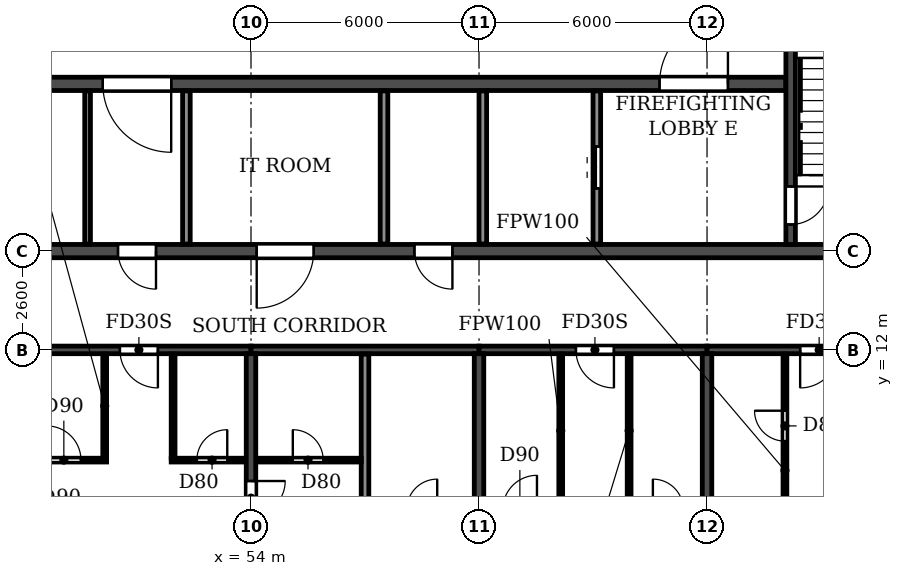
"""IFC4 building model, lengths in metres.
Left out: names, types, materials, properties, quantities, classifications, styles, units other than length and angle.
Written with IfcOpenShell. Run it as: python <this file> out.ifc"""

import sys

from ifc_helpers import new_model, si_unit, direction, frame, frame_2d, origin, place, context, subcontext, project, spatial, rectangle, extrude, element, fill, save


model = new_model("IFC4")
c1 = context("Model", 3, precision=1e-05, world=origin(), true_north=direction((0.0, 1.0)))
c2 = subcontext(c1, "Body", "Model", "MODEL_VIEW")
j1 = project(units=[si_unit("LENGTHUNIT", "METRE"), si_unit("PLANEANGLEUNIT", "RADIAN")], contexts=[c1])
p1 = place(None, origin())
s1 = spatial("IfcSite", under=j1, at=p1, CompositionType="ELEMENT")
p2 = place(p1, origin())
s2 = spatial("IfcBuilding", under=s1, at=p2, CompositionType="ELEMENT")
p3 = place(p2, frame((0.0, 0.0, 221.4)))
s3 = spatial("IfcBuildingStorey", under=s2, at=p3, CompositionType="ELEMENT", Elevation=221.4)
p4 = place(p3, frame((54.0, 0.2, 0.0), z_axis=(0.0, 0.0, 1.0), x_axis=(0.0, 1.0, 0.0)))
e1 = element("IfcWall", 1, at=p4, inside=s3, PredefinedType="SHEAR", context=c2, shape_type="SweptSolid", body=[
    extrude(rectangle(XDim=11.7, YDim=0.25, at=frame_2d((5.85, 0.0))), origin(), (0.0, 0.0, 1.0), 3.08),
])
p5 = place(p4, frame((7.45, 0.0, 0.0)))
e2 = element("IfcOpeningElement", 2, at=p5, cuts=e1, PredefinedType="OPENING", context=c2, shape_type="SweptSolid", body=[
    extrude(rectangle(XDim=0.9, YDim=2.1, at=frame_2d((0.45, 1.05))), frame((0.0, 0.135, 0.0), z_axis=(0.0, -1.0, 0.0), x_axis=(1.0, 0.0, 0.0)), (0.0, 0.0, 1.0), 0.27),
])
p6 = place(p3, frame((60.0, 0.2, 0.0), z_axis=(0.0, 0.0, 1.0), x_axis=(0.0, 1.0, 0.0)))
e3 = element("IfcWall", 3, at=p6, inside=s3, PredefinedType="SHEAR", context=c2, shape_type="SweptSolid", body=[
    extrude(rectangle(XDim=11.7, YDim=0.25, at=frame_2d((5.85, 0.0))), origin(), (0.0, 0.0, 1.0), 3.08),
])
p7 = place(p6, frame((6.15, 0.0, 0.0)))
e4 = element("IfcOpeningElement", 4, at=p7, cuts=e3, PredefinedType="OPENING", context=c2, shape_type="SweptSolid", body=[
    extrude(rectangle(XDim=0.9, YDim=2.1, at=frame_2d((0.45, 1.05))), frame((0.0, 0.135, 0.0), z_axis=(0.0, -1.0, 0.0), x_axis=(1.0, 0.0, 0.0)), (0.0, 0.0, 1.0), 0.27),
])
p8 = place(p3, frame((66.0, 0.2, 0.0), z_axis=(0.0, 0.0, 1.0), x_axis=(0.0, 1.0, 0.0)))
e5 = element("IfcWall", 5, at=p8, inside=s3, PredefinedType="SHEAR", context=c2, shape_type="SweptSolid", body=[
    extrude(rectangle(XDim=11.7, YDim=0.25, at=frame_2d((5.85, 0.0))), origin(), (0.0, 0.0, 1.0), 3.08),
])
p9 = place(p3, frame((48.0, 12.0, 0.0), z_axis=(0.0, 0.0, 1.0), x_axis=(1.0, 0.0, 0.0)))
e6 = element("IfcWall", 6, at=p9, inside=s3, PredefinedType="SHEAR", context=c2, shape_type="SweptSolid", body=[
    extrude(rectangle(XDim=6.0, YDim=0.2, at=frame_2d((3.0, 0.0))), origin(), (0.0, 0.0, 1.0), 2.48),
])
p10 = place(p9, frame((2.55, 0.0, 0.0)))
e7 = element("IfcOpeningElement", 7, at=p10, cuts=e6, PredefinedType="OPENING", context=c2, shape_type="SweptSolid", body=[
    extrude(rectangle(XDim=1.0, YDim=2.1, at=frame_2d((0.5, 1.05))), frame((0.0, 0.11, 0.0), z_axis=(0.0, -1.0, 0.0), x_axis=(1.0, 0.0, 0.0)), (0.0, 0.0, 1.0), 0.22),
])
p11 = place(p3, frame((54.0, 12.0, 0.0), z_axis=(0.0, 0.0, 1.0), x_axis=(1.0, 0.0, 0.0)))
e8 = element("IfcWall", 8, at=p11, inside=s3, PredefinedType="SHEAR", context=c2, shape_type="SweptSolid", body=[
    extrude(rectangle(XDim=6.0, YDim=0.2, at=frame_2d((3.0, 0.0))), origin(), (0.0, 0.0, 1.0), 2.48),
])
p12 = place(p3, frame((60.0, 12.0, 0.0), z_axis=(0.0, 0.0, 1.0), x_axis=(1.0, 0.0, 0.0)))
e9 = element("IfcWall", 9, at=p12, inside=s3, PredefinedType="SHEAR", context=c2, shape_type="SweptSolid", body=[
    extrude(rectangle(XDim=6.0, YDim=0.2, at=frame_2d((3.0, 0.0))), origin(), (0.0, 0.0, 1.0), 2.48),
])
p13 = place(p12, frame((2.55, 0.0, 0.0)))
e10 = element("IfcOpeningElement", 10, at=p13, cuts=e9, PredefinedType="OPENING", context=c2, shape_type="SweptSolid", body=[
    extrude(rectangle(XDim=1.0, YDim=2.1, at=frame_2d((0.5, 1.05))), frame((0.0, 0.11, 0.0), z_axis=(0.0, -1.0, 0.0), x_axis=(1.0, 0.0, 0.0)), (0.0, 0.0, 1.0), 0.22),
])
p14 = place(p3, frame((66.0, 12.0, 0.0), z_axis=(0.0, 0.0, 1.0), x_axis=(1.0, 0.0, 0.0)))
e11 = element("IfcWall", 11, at=p14, inside=s3, PredefinedType="SHEAR", context=c2, shape_type="SweptSolid", body=[
    extrude(rectangle(XDim=6.0, YDim=0.2, at=frame_2d((3.0, 0.0))), origin(), (0.0, 0.0, 1.0), 2.48),
])
p15 = place(p14, frame((2.45, 0.0, 0.0)))
e12 = element("IfcOpeningElement", 12, at=p15, cuts=e11, PredefinedType="OPENING", context=c2, shape_type="SweptSolid", body=[
    extrude(rectangle(XDim=1.0, YDim=2.1, at=frame_2d((0.5, 1.05))), frame((0.0, 0.11, 0.0), z_axis=(0.0, -1.0, 0.0), x_axis=(1.0, 0.0, 0.0)), (0.0, 0.0, 1.0), 0.22),
])
p16 = place(p3, frame((18.2, 14.6, 0.0), z_axis=(0.0, 0.0, 1.0), x_axis=(1.0, 0.0, 0.0)))
e13 = element("IfcWall", 13, at=p16, inside=s3, PredefinedType="SOLIDWALL", context=c2, shape_type="SweptSolid", body=[
    extrude(rectangle(XDim=65.6, YDim=0.35, at=frame_2d((32.8, 0.0))), origin(), (0.0, 0.0, 1.0), 3.08),
])
p17 = place(p16, frame((0.7, 0.0, 0.0)))
e14 = element("IfcOpeningElement", 14, at=p17, cuts=e13, PredefinedType="OPENING", context=c2, shape_type="SweptSolid", body=[
    extrude(rectangle(XDim=1.0, YDim=2.1, at=frame_2d((0.5, 1.05))), frame((0.0, 0.185, 0.0), z_axis=(0.0, -1.0, 0.0), x_axis=(1.0, 0.0, 0.0)), (0.0, 0.0, 1.0), 0.37),
])
p18 = place(p16, frame((8.6, 0.0, 0.0)))
e15 = element("IfcOpeningElement", 15, at=p18, cuts=e13, PredefinedType="OPENING", context=c2, shape_type="SweptSolid", body=[
    extrude(rectangle(XDim=1.0, YDim=2.1, at=frame_2d((0.5, 1.05))), frame((0.0, 0.185, 0.0), z_axis=(0.0, -1.0, 0.0), x_axis=(1.0, 0.0, 0.0)), (0.0, 0.0, 1.0), 0.37),
])
p19 = place(p16, frame((13.2, 0.0, 0.0)))
e16 = element("IfcOpeningElement", 16, at=p19, cuts=e13, PredefinedType="OPENING", context=c2, shape_type="SweptSolid", body=[
    extrude(rectangle(XDim=1.0, YDim=2.1, at=frame_2d((0.5, 1.05))), frame((0.0, 0.185, 0.0), z_axis=(0.0, -1.0, 0.0), x_axis=(1.0, 0.0, 0.0)), (0.0, 0.0, 1.0), 0.37),
])
p20 = place(p16, frame((27.1, 0.0, 0.0)))
e17 = element("IfcOpeningElement", 17, at=p20, cuts=e13, PredefinedType="OPENING", context=c2, shape_type="SweptSolid", body=[
    extrude(rectangle(XDim=1.0, YDim=2.1, at=frame_2d((0.5, 1.05))), frame((0.0, 0.185, 0.0), z_axis=(0.0, -1.0, 0.0), x_axis=(1.0, 0.0, 0.0)), (0.0, 0.0, 1.0), 0.37),
])
p21 = place(p16, frame((32.3, 0.0, 0.0)))
e18 = element("IfcOpeningElement", 18, at=p21, cuts=e13, PredefinedType="OPENING", context=c2, shape_type="SweptSolid", body=[
    extrude(rectangle(XDim=1.0, YDim=2.1, at=frame_2d((0.5, 1.05))), frame((0.0, 0.185, 0.0), z_axis=(0.0, -1.0, 0.0), x_axis=(1.0, 0.0, 0.0)), (0.0, 0.0, 1.0), 0.37),
])
p22 = place(p16, frame((35.95, 0.0, 0.0)))
e19 = element("IfcOpeningElement", 19, at=p22, cuts=e13, PredefinedType="OPENING", context=c2, shape_type="SweptSolid", body=[
    extrude(rectangle(XDim=1.5, YDim=2.1, at=frame_2d((0.75, 1.05))), frame((0.0, 0.185, 0.0), z_axis=(0.0, -1.0, 0.0), x_axis=(1.0, 0.0, 0.0)), (0.0, 0.0, 1.0), 0.37),
])
p23 = place(p16, frame((40.1, 0.0, 0.0)))
e20 = element("IfcOpeningElement", 20, at=p23, cuts=e13, PredefinedType="OPENING", context=c2, shape_type="SweptSolid", body=[
    extrude(rectangle(XDim=1.0, YDim=2.1, at=frame_2d((0.5, 1.05))), frame((0.0, 0.185, 0.0), z_axis=(0.0, -1.0, 0.0), x_axis=(1.0, 0.0, 0.0)), (0.0, 0.0, 1.0), 0.37),
])
p24 = place(p16, frame((51.4, 0.0, 0.0)))
e21 = element("IfcOpeningElement", 21, at=p24, cuts=e13, PredefinedType="OPENING", context=c2, shape_type="SweptSolid", body=[
    extrude(rectangle(XDim=1.0, YDim=2.1, at=frame_2d((0.5, 1.05))), frame((0.0, 0.185, 0.0), z_axis=(0.0, -1.0, 0.0), x_axis=(1.0, 0.0, 0.0)), (0.0, 0.0, 1.0), 0.37),
])
p25 = place(p16, frame((56.0, 0.0, 0.0)))
e22 = element("IfcOpeningElement", 22, at=p25, cuts=e13, PredefinedType="OPENING", context=c2, shape_type="SweptSolid", body=[
    extrude(rectangle(XDim=1.0, YDim=2.1, at=frame_2d((0.5, 1.05))), frame((0.0, 0.185, 0.0), z_axis=(0.0, -1.0, 0.0), x_axis=(1.0, 0.0, 0.0)), (0.0, 0.0, 1.0), 0.37),
])
p26 = place(p16, frame((63.9, 0.0, 0.0)))
e23 = element("IfcOpeningElement", 23, at=p26, cuts=e13, PredefinedType="OPENING", context=c2, shape_type="SweptSolid", body=[
    extrude(rectangle(XDim=1.0, YDim=2.1, at=frame_2d((0.5, 1.05))), frame((0.0, 0.185, 0.0), z_axis=(0.0, -1.0, 0.0), x_axis=(1.0, 0.0, 0.0)), (0.0, 0.0, 1.0), 0.37),
])
p27 = place(p3, frame((33.925, 19.0, 0.0), z_axis=(0.0, 0.0, 1.0), x_axis=(1.0, 0.0, 0.0)))
e24 = element("IfcWall", 24, at=p27, inside=s3, PredefinedType="SOLIDWALL", context=c2, shape_type="SweptSolid", body=[
    extrude(rectangle(XDim=34.15, YDim=0.35, at=frame_2d((17.075, 0.0))), origin(), (0.0, 0.0, 1.0), 3.08),
])
p28 = place(p27, frame((16.175, 0.0, 0.0)))
e25 = element("IfcOpeningElement", 25, at=p28, cuts=e24, PredefinedType="OPENING", context=c2, shape_type="SweptSolid", body=[
    extrude(rectangle(XDim=1.8, YDim=2.1, at=frame_2d((0.9, 1.05))), frame((0.0, 0.185, 0.0), z_axis=(0.0, -1.0, 0.0), x_axis=(1.0, 0.0, 0.0)), (0.0, 0.0, 1.0), 0.37),
])
p29 = place(p27, frame((1.525, 0.0, 0.0)))
e26 = element("IfcOpeningElement", 26, at=p29, cuts=e24, PredefinedType="OPENING", context=c2, shape_type="SweptSolid", body=[
    extrude(rectangle(XDim=1.8, YDim=2.1, at=frame_2d((0.9, 1.05))), frame((0.0, 0.185, 0.0), z_axis=(0.0, -1.0, 0.0), x_axis=(1.0, 0.0, 0.0)), (0.0, 0.0, 1.0), 0.37),
])
p30 = place(p27, frame((30.825, 0.0, 0.0)))
e27 = element("IfcOpeningElement", 27, at=p30, cuts=e24, PredefinedType="OPENING", context=c2, shape_type="SweptSolid", body=[
    extrude(rectangle(XDim=1.8, YDim=2.1, at=frame_2d((0.9, 1.05))), frame((0.0, 0.185, 0.0), z_axis=(0.0, -1.0, 0.0), x_axis=(1.0, 0.0, 0.0)), (0.0, 0.0, 1.0), 0.37),
])
p31 = place(p3, frame((68.2, 14.775, 0.0), z_axis=(0.0, 0.0, 1.0), x_axis=(0.0, 1.0, 0.0)))
e28 = element("IfcWall", 28, at=p31, inside=s3, PredefinedType="SOLIDWALL", context=c2, shape_type="SweptSolid", body=[
    extrude(rectangle(XDim=7.7, YDim=0.25, at=frame_2d((3.85, 0.0))), origin(), (0.0, 0.0, 1.0), 3.08),
])
p32 = place(p31, frame((0.525, 0.0, 0.0)))
e29 = element("IfcOpeningElement", 29, at=p32, cuts=e28, PredefinedType="OPENING", context=c2, shape_type="SweptSolid", body=[
    extrude(rectangle(XDim=1.0, YDim=2.1, at=frame_2d((0.5, 1.05))), frame((0.0, 0.135, 0.0), z_axis=(0.0, -1.0, 0.0), x_axis=(1.0, 0.0, 0.0)), (0.0, 0.0, 1.0), 0.27),
])
p33 = place(p3, frame((49.7, 14.785, 0.0), z_axis=(0.0, 0.0, 1.0), x_axis=(0.0, 1.0, 0.0)))
e30 = element("IfcWall", 30, at=p33, inside=s3, PredefinedType="PARTITIONING", context=c2, shape_type="SweptSolid", body=[
    extrude(rectangle(XDim=4.03, YDim=0.15, at=frame_2d((2.015, 0.0))), origin(), (0.0, 0.0, 1.0), 3.08),
])
p34 = place(p3, frame((57.0, 0.06, 0.0), z_axis=(0.0, 0.0, 1.0), x_axis=(0.0, 1.0, 0.0)))
e31 = element("IfcWall", 31, at=p34, inside=s3, PredefinedType="PARTITIONING", context=c2, shape_type="SweptSolid", body=[
    extrude(rectangle(XDim=11.83, YDim=0.2, at=frame_2d((5.915, 0.0))), origin(), (0.0, 0.0, 1.0), 3.08),
])
p35 = place(p3, frame((48.135, 9.1, 0.0), z_axis=(0.0, 0.0, 1.0), x_axis=(1.0, 0.0, 0.0)))
e32 = element("IfcWall", 32, at=p35, inside=s3, PredefinedType="PARTITIONING", context=c2, shape_type="SweptSolid", body=[
    extrude(rectangle(XDim=2.065, YDim=0.1, at=frame_2d((1.032, 0.0))), origin(), (0.0, 0.0, 1.0), 3.08),
])
p36 = place(p35, frame((0.49, 0.0, 0.0)))
e33 = element("IfcOpeningElement", 33, at=p36, cuts=e32, PredefinedType="OPENING", context=c2, shape_type="SweptSolid", body=[
    extrude(rectangle(XDim=0.9, YDim=2.1, at=frame_2d((0.45, 1.05))), frame((0.0, 0.06, 0.0), z_axis=(0.0, -1.0, 0.0), x_axis=(1.0, 0.0, 0.0)), (0.0, 0.0, 1.0), 0.12),
])
p37 = place(p3, frame((51.9, 9.1, 0.0), z_axis=(0.0, 0.0, 1.0), x_axis=(1.0, 0.0, 0.0)))
e34 = element("IfcWall", 34, at=p37, inside=s3, PredefinedType="PARTITIONING", context=c2, shape_type="SweptSolid", body=[
    extrude(rectangle(XDim=1.965, YDim=0.1, at=frame_2d((0.982, 0.0))), origin(), (0.0, 0.0, 1.0), 3.08),
])
p38 = place(p37, frame((0.675, 0.0, 0.0)))
e35 = element("IfcOpeningElement", 35, at=p38, cuts=e34, PredefinedType="OPENING", context=c2, shape_type="SweptSolid", body=[
    extrude(rectangle(XDim=0.8, YDim=2.1, at=frame_2d((0.4, 1.05))), frame((0.0, 0.06, 0.0), z_axis=(0.0, -1.0, 0.0), x_axis=(1.0, 0.0, 0.0)), (0.0, 0.0, 1.0), 0.12),
])
p39 = place(p3, frame((54.135, 9.1, 0.0), z_axis=(0.0, 0.0, 1.0), x_axis=(1.0, 0.0, 0.0)))
e36 = element("IfcWall", 36, at=p39, inside=s3, PredefinedType="PARTITIONING", context=c2, shape_type="SweptSolid", body=[
    extrude(rectangle(XDim=2.765, YDim=0.1, at=frame_2d((1.382, 0.0))), origin(), (0.0, 0.0, 1.0), 3.08),
])
p40 = place(p39, frame((0.965, 0.0, 0.0)))
e37 = element("IfcOpeningElement", 37, at=p40, cuts=e36, PredefinedType="OPENING", context=c2, shape_type="SweptSolid", body=[
    extrude(rectangle(XDim=0.8, YDim=2.1, at=frame_2d((0.4, 1.05))), frame((0.0, 0.06, 0.0), z_axis=(0.0, -1.0, 0.0), x_axis=(1.0, 0.0, 0.0)), (0.0, 0.0, 1.0), 0.12),
])
for number, where, z_axis, x_axis in (
    (38, (50.15, 9.15, 0.0), (0.0, 0.0, 1.0), (0.0, 1.0, 0.0)),
    (39, (51.95, 9.15, 0.0), (0.0, 0.0, 1.0), (0.0, 1.0, 0.0)),
):
    element("IfcWall", number, at=place(p3, frame(where, z_axis=z_axis, x_axis=x_axis)), inside=s3, PredefinedType="PARTITIONING", context=c2, shape_type="SweptSolid", body=[
        extrude(rectangle(XDim=2.74, YDim=0.1, at=frame_2d((1.37, 0.0))), origin(), (0.0, 0.0, 1.0), 3.08),
    ])
for number, where, z_axis, x_axis in (
    (40, (62.15, 7.85, 0.0), (0.0, 0.0, 1.0), (0.0, 1.0, 0.0)),
    (41, (63.95, 7.85, 0.0), (0.0, 0.0, 1.0), (0.0, 1.0, 0.0)),
):
    element("IfcWall", number, at=place(p3, frame(where, z_axis=z_axis, x_axis=x_axis)), inside=s3, PredefinedType="PARTITIONING", context=c2, shape_type="SweptSolid", body=[
        extrude(rectangle(XDim=4.04, YDim=0.1, at=frame_2d((2.02, 0.0))), origin(), (0.0, 0.0, 1.0), 3.08),
    ])
p41 = place(p3, frame((68.05, 8.05, 0.0), z_axis=(0.0, 0.0, 1.0), x_axis=(0.0, 1.0, 0.0)))
e42 = element("IfcWall", 42, at=p41, inside=s3, PredefinedType="PARTITIONING", context=c2, shape_type="SweptSolid", body=[
    extrude(rectangle(XDim=3.84, YDim=0.1, at=frame_2d((1.92, 0.0))), origin(), (0.0, 0.0, 1.0), 3.08),
])
p42 = place(p41, frame((1.55, 0.0, 0.0)))
e43 = element("IfcOpeningElement", 43, at=p42, cuts=e42, PredefinedType="OPENING", context=c2, shape_type="SweptSolid", body=[
    extrude(rectangle(XDim=0.8, YDim=2.1, at=frame_2d((0.4, 1.05))), frame((0.0, 0.06, 0.0), z_axis=(0.0, -1.0, 0.0), x_axis=(1.0, 0.0, 0.0)), (0.0, 0.0, 1.0), 0.12),
])
for number, where, z_axis, x_axis in (
    (44, (52.3, 14.785, 0.0), (0.0, 0.0, 1.0), (0.0, 1.0, 0.0)),
    (45, (57.5, 14.785, 0.0), (0.0, 0.0, 1.0), (0.0, 1.0, 0.0)),
    (46, (60.1, 14.785, 0.0), (0.0, 0.0, 1.0), (0.0, 1.0, 0.0)),
):
    element("IfcWall", number, at=place(p3, frame(where, z_axis=z_axis, x_axis=x_axis)), inside=s3, PredefinedType="PARTITIONING", context=c2, shape_type="SweptSolid", body=[
        extrude(rectangle(XDim=4.03, YDim=0.2, at=frame_2d((2.015, 0.0))), origin(), (0.0, 0.0, 1.0), 3.08),
    ])
p43 = place(p3, frame((63.1, 14.785, 0.0), z_axis=(0.0, 0.0, 1.0), x_axis=(0.0, 1.0, 0.0)))
e47 = element("IfcWall", 47, at=p43, inside=s3, PredefinedType="PARTITIONING", context=c2, shape_type="SweptSolid", body=[
    extrude(rectangle(XDim=4.03, YDim=0.2, at=frame_2d((2.015, 0.0))), origin(), (0.0, 0.0, 1.0), 3.08),
])
p44 = place(p43, frame((1.465, 0.0, 0.0)))
e48 = element("IfcOpeningElement", 48, at=p44, cuts=e47, PredefinedType="OPENING", context=c2, shape_type="SweptSolid", body=[
    extrude(rectangle(XDim=1.1, YDim=2.1, at=frame_2d((0.55, 1.05))), frame((0.0, 0.11, 0.0), z_axis=(0.0, -1.0, 0.0), x_axis=(1.0, 0.0, 0.0)), (0.0, 0.0, 1.0), 0.22),
])
p45 = place(p21, frame((1.0, 0.0, 0.0), z_axis=(0.0, 0.0, 1.0), x_axis=(-1.0, 0.0, 0.0)))
e49 = element("IfcDoor", 49, at=p45, inside=s3, OperationType="SINGLE_SWING_LEFT", PredefinedType="DOOR", context=c2, shape_type="SweptSolid", body=[
    extrude(rectangle(XDim=1.0, YDim=2.1, at=frame_2d((0.5, 1.05))), frame((0.0, 0.025, 0.0), z_axis=(0.0, -1.0, 0.0), x_axis=(1.0, 0.0, 0.0)), (0.0, 0.0, 1.0), 0.05),
])
fill(e18, e49)
p46 = place(p22, frame((1.5, 0.0, 0.0), z_axis=(0.0, 0.0, 1.0), x_axis=(-1.0, 0.0, 0.0)))
e50 = element("IfcDoor", 50, at=p46, inside=s3, OperationType="DOUBLE_DOOR_SINGLE_SWING", PredefinedType="DOOR", context=c2, shape_type="SweptSolid", body=[
    extrude(rectangle(XDim=1.5, YDim=2.1, at=frame_2d((0.75, 1.05))), frame((0.0, 0.025, 0.0), z_axis=(0.0, -1.0, 0.0), x_axis=(1.0, 0.0, 0.0)), (0.0, 0.0, 1.0), 0.05),
])
fill(e19, e50)
p47 = place(p23, frame((1.0, 0.0, 0.0), z_axis=(0.0, 0.0, 1.0), x_axis=(-1.0, 0.0, 0.0)))
e51 = element("IfcDoor", 51, at=p47, inside=s3, OperationType="SINGLE_SWING_LEFT", PredefinedType="DOOR", context=c2, shape_type="SweptSolid", body=[
    extrude(rectangle(XDim=1.0, YDim=2.1, at=frame_2d((0.5, 1.05))), frame((0.0, 0.025, 0.0), z_axis=(0.0, -1.0, 0.0), x_axis=(1.0, 0.0, 0.0)), (0.0, 0.0, 1.0), 0.05),
])
fill(e20, e51)
p48 = place(p40, origin())
e52 = element("IfcDoor", 52, at=p48, inside=s3, OperationType="SINGLE_SWING_LEFT", PredefinedType="DOOR", context=c2, shape_type="SweptSolid", body=[
    extrude(rectangle(XDim=0.8, YDim=2.1, at=frame_2d((0.4, 1.05))), frame((0.0, 0.025, 0.0), z_axis=(0.0, -1.0, 0.0), x_axis=(1.0, 0.0, 0.0)), (0.0, 0.0, 1.0), 0.05),
])
fill(e37, e52)
p49 = place(p36, origin())
e53 = element("IfcDoor", 53, at=p49, inside=s3, OperationType="SINGLE_SWING_LEFT", PredefinedType="DOOR", context=c2, shape_type="SweptSolid", body=[
    extrude(rectangle(XDim=0.9, YDim=2.1, at=frame_2d((0.45, 1.05))), frame((0.0, 0.025, 0.0), z_axis=(0.0, -1.0, 0.0), x_axis=(1.0, 0.0, 0.0)), (0.0, 0.0, 1.0), 0.05),
])
fill(e33, e53)
p50 = place(p10, frame((1.0, 0.0, 0.0), z_axis=(0.0, 0.0, 1.0), x_axis=(-1.0, 0.0, 0.0)))
e54 = element("IfcDoor", 54, at=p50, inside=s3, OperationType="SINGLE_SWING_LEFT", PredefinedType="DOOR", context=c2, shape_type="SweptSolid", body=[
    extrude(rectangle(XDim=1.0, YDim=2.1, at=frame_2d((0.5, 1.05))), frame((0.0, 0.025, 0.0), z_axis=(0.0, -1.0, 0.0), x_axis=(1.0, 0.0, 0.0)), (0.0, 0.0, 1.0), 0.05),
])
fill(e7, e54)
p51 = place(p38, origin())
e55 = element("IfcDoor", 55, at=p51, inside=s3, OperationType="SINGLE_SWING_RIGHT", PredefinedType="DOOR", context=c2, shape_type="SweptSolid", body=[
    extrude(rectangle(XDim=0.8, YDim=2.1, at=frame_2d((0.4, 1.05))), frame((0.0, 0.025, 0.0), z_axis=(0.0, -1.0, 0.0), x_axis=(1.0, 0.0, 0.0)), (0.0, 0.0, 1.0), 0.05),
])
fill(e35, e55)
p52 = place(p5, frame((0.9, 0.0, 0.0), z_axis=(0.0, 0.0, 1.0), x_axis=(-1.0, 0.0, 0.0)))
e56 = element("IfcDoor", 56, at=p52, inside=s3, OperationType="SINGLE_SWING_LEFT", PredefinedType="DOOR", context=c2, shape_type="SweptSolid", body=[
    extrude(rectangle(XDim=0.9, YDim=2.1, at=frame_2d((0.45, 1.05))), frame((0.0, 0.025, 0.0), z_axis=(0.0, -1.0, 0.0), x_axis=(1.0, 0.0, 0.0)), (0.0, 0.0, 1.0), 0.05),
])
fill(e2, e56)
p53 = place(p13, frame((1.0, 0.0, 0.0), z_axis=(0.0, 0.0, 1.0), x_axis=(-1.0, 0.0, 0.0)))
e57 = element("IfcDoor", 57, at=p53, inside=s3, OperationType="SINGLE_SWING_LEFT", PredefinedType="DOOR", context=c2, shape_type="SweptSolid", body=[
    extrude(rectangle(XDim=1.0, YDim=2.1, at=frame_2d((0.5, 1.05))), frame((0.0, 0.025, 0.0), z_axis=(0.0, -1.0, 0.0), x_axis=(1.0, 0.0, 0.0)), (0.0, 0.0, 1.0), 0.05),
])
fill(e10, e57)
p54 = place(p42, origin())
e58 = element("IfcDoor", 58, at=p54, inside=s3, OperationType="SINGLE_SWING_RIGHT", PredefinedType="DOOR", context=c2, shape_type="SweptSolid", body=[
    extrude(rectangle(XDim=0.8, YDim=2.1, at=frame_2d((0.4, 1.05))), frame((0.0, 0.025, 0.0), z_axis=(0.0, -1.0, 0.0), x_axis=(1.0, 0.0, 0.0)), (0.0, 0.0, 1.0), 0.05),
])
fill(e43, e58)
p55 = place(p15, frame((1.0, 0.0, 0.0), z_axis=(0.0, 0.0, 1.0), x_axis=(-1.0, 0.0, 0.0)))
e59 = element("IfcDoor", 59, at=p55, inside=s3, OperationType="SINGLE_SWING_RIGHT", PredefinedType="DOOR", context=c2, shape_type="SweptSolid", body=[
    extrude(rectangle(XDim=1.0, YDim=2.1, at=frame_2d((0.5, 1.05))), frame((0.0, 0.025, 0.0), z_axis=(0.0, -1.0, 0.0), x_axis=(1.0, 0.0, 0.0)), (0.0, 0.0, 1.0), 0.05),
])
fill(e12, e59)
p56 = place(p44, origin())
e60 = element("IfcDoor", 60, at=p56, inside=s3, OperationType="DOUBLE_DOOR_SLIDING", PredefinedType="DOOR", context=c2, shape_type="SweptSolid", body=[
    extrude(rectangle(XDim=1.1, YDim=2.1, at=frame_2d((0.55, 1.05))), frame((0.0, 0.025, 0.0), z_axis=(0.0, -1.0, 0.0), x_axis=(1.0, 0.0, 0.0)), (0.0, 0.0, 1.0), 0.05),
])
fill(e48, e60)
p57 = place(p32, frame((1.0, 0.0, 0.0), z_axis=(0.0, 0.0, 1.0), x_axis=(-1.0, 0.0, 0.0)))
e61 = element("IfcDoor", 61, at=p57, inside=s3, OperationType="SINGLE_SWING_LEFT", PredefinedType="DOOR", context=c2, shape_type="SweptSolid", body=[
    extrude(rectangle(XDim=1.0, YDim=2.1, at=frame_2d((0.5, 1.05))), frame((0.0, 0.025, 0.0), z_axis=(0.0, -1.0, 0.0), x_axis=(1.0, 0.0, 0.0)), (0.0, 0.0, 1.0), 0.05),
])
fill(e29, e61)
p58 = place(p28, frame((1.8, 0.0, 0.0), z_axis=(0.0, 0.0, 1.0), x_axis=(-1.0, 0.0, 0.0)))
e62 = element("IfcDoor", 62, at=p58, inside=s3, OperationType="DOUBLE_DOOR_SINGLE_SWING", PredefinedType="DOOR", context=c2, shape_type="SweptSolid", body=[
    extrude(rectangle(XDim=1.8, YDim=2.1, at=frame_2d((0.9, 1.05))), frame((0.0, 0.025, 0.0), z_axis=(0.0, -1.0, 0.0), x_axis=(1.0, 0.0, 0.0)), (0.0, 0.0, 1.0), 0.05),
])
fill(e25, e62)
p59 = place(p30, origin())
e63 = element("IfcDoor", 63, at=p59, inside=s3, OperationType="DOUBLE_DOOR_SINGLE_SWING", PredefinedType="DOOR", context=c2, shape_type="SweptSolid", body=[
    extrude(rectangle(XDim=1.8, YDim=2.1, at=frame_2d((0.9, 1.05))), frame((0.0, 0.025, 0.0), z_axis=(0.0, -1.0, 0.0), x_axis=(1.0, 0.0, 0.0)), (0.0, 0.0, 1.0), 0.05),
])
fill(e27, e63)
save(model, sys.argv[1])
